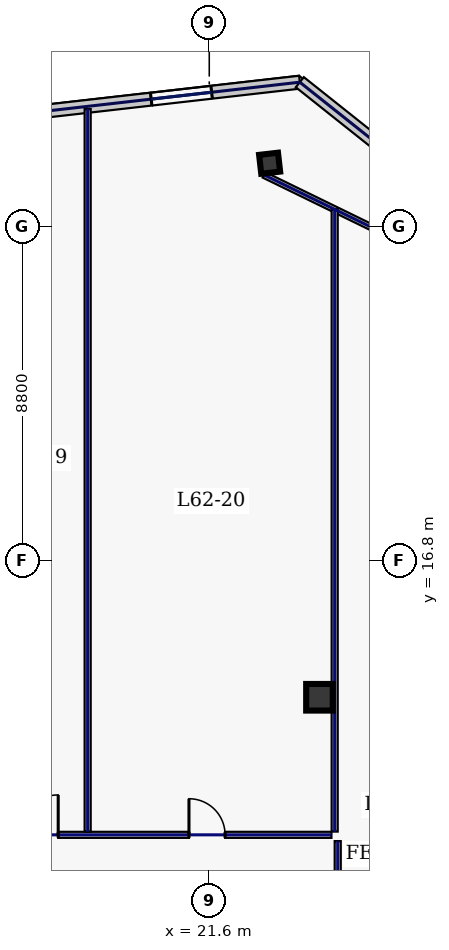
"""IFC4 building model, lengths in metres.
Left out: names, types, materials, properties, quantities, classifications, styles, units other than length and angle.
Written with IfcOpenShell. Run it as: python <this file> out.ifc"""

import sys

from ifc_helpers import new_model, si_unit, direction, frame, frame_2d, origin, origin_2d, place, context, subcontext, project, spatial, rectangle, hollow_rectangle, extrude, element, fill, save


model = new_model("IFC4")
c1 = context("Model", 3, precision=1e-05, world=origin(), true_north=direction((0.0, 1.0)))
c2 = subcontext(c1, "Body", "Model", "MODEL_VIEW")
j1 = project(units=[si_unit("LENGTHUNIT", "METRE"), si_unit("PLANEANGLEUNIT", "RADIAN")], contexts=[c1])
p1 = place(None, origin())
s1 = spatial("IfcSite", under=j1, at=p1, CompositionType="ELEMENT")
p2 = place(p1, origin())
s2 = spatial("IfcBuilding", under=s1, at=p2, CompositionType="ELEMENT")
p3 = place(p2, frame((0.0, 0.0, 267.0)))
s3 = spatial("IfcBuildingStorey", under=s2, at=p3, CompositionType="ELEMENT", Elevation=267.0)
p4 = place(p3, frame((24.5, 13.2, 0.0), z_axis=(0.0, 0.0, 1.0), x_axis=(1.0, 0.0, 0.0)))
e1 = element("IfcColumn", 1, at=p4, inside=s3, PredefinedType="COLUMN", context=c2, shape_type="SweptSolid", body=[
    extrude(hollow_rectangle(XDim=0.7, YDim=0.7, WallThickness=0.032, at=origin_2d()), origin(), (0.0, 0.0, 1.0), 3.68),
])
p5 = place(p3, frame((23.188, 27.253, 0.0), z_axis=(0.0, 0.0, 1.0), x_axis=(0.993571855677, 0.113203213768, 0.0)))
e2 = element("IfcColumn", 2, at=p5, inside=s3, PredefinedType="COLUMN", context=c2, shape_type="SweptSolid", body=[
    extrude(hollow_rectangle(XDim=0.5, YDim=0.5, WallThickness=0.025, at=origin_2d()), origin(), (0.0, 0.0, 1.0), 3.68),
])
p6 = place(p3, frame((23.983, 29.386, 0.0), z_axis=(0.0, 0.0, 1.0), x_axis=(-0.993572271362, -0.113199565282, 0.0)))
e3 = element("IfcWall", 3, at=p6, inside=s3, PredefinedType="STANDARD", context=c2, shape_type="SweptSolid", body=[
    extrude(rectangle(XDim=18.651, YDim=0.34, at=frame_2d((9.326, 0.0))), origin(), (0.0, 0.0, 1.0), 3.68),
])
p7 = place(p6, frame((10.229, 0.0, 0.22)))
e4 = element("IfcOpeningElement", 4, at=p7, cuts=e3, PredefinedType="OPENING", context=c2, shape_type="SweptSolid", body=[
    extrude(rectangle(XDim=1.6, YDim=1.2, at=frame_2d((0.8, 0.6))), frame((0.0, 0.18, 0.0), z_axis=(0.0, -1.0, 0.0), x_axis=(1.0, 0.0, 0.0)), (0.0, 0.0, 1.0), 0.36),
])
p8 = place(p6, frame((2.336, 0.0, 0.22)))
e5 = element("IfcOpeningElement", 5, at=p8, cuts=e3, PredefinedType="OPENING", context=c2, shape_type="SweptSolid", body=[
    extrude(rectangle(XDim=1.6, YDim=1.2, at=frame_2d((0.8, 0.6))), frame((0.0, 0.18, 0.0), z_axis=(0.0, -1.0, 0.0), x_axis=(1.0, 0.0, 0.0)), (0.0, 0.0, 1.0), 0.36),
])
p9 = place(p3, frame((29.107, 25.31, 0.0), z_axis=(0.0, 0.0, 1.0), x_axis=(-0.78259733853, 0.62252823689, 0.0)))
e6 = element("IfcWall", 6, at=p9, inside=s3, PredefinedType="STANDARD", context=c2, shape_type="SweptSolid", body=[
    extrude(rectangle(XDim=6.548, YDim=0.34, at=frame_2d((3.274, 0.0))), origin(), (0.0, 0.0, 1.0), 3.68),
])
p10 = place(p3, frame((28.528, 24.271, 0.0), z_axis=(0.0, 0.0, 1.0), x_axis=(-0.898820692789, 0.438316509173, 0.0)))
e7 = element("IfcWall", 7, at=p10, inside=s3, PredefinedType="PARTITIONING", context=c2, shape_type="SweptSolid", body=[
    extrude(rectangle(XDim=6.107, YDim=0.16, at=frame_2d((3.053, 0.0))), origin(), (0.0, 0.0, 1.0), 1.475),
])
p11 = place(p3, frame((-24.815, 9.58, 0.0), z_axis=(0.0, 0.0, 1.0), x_axis=(1.0, 0.0, 0.0)))
e8 = element("IfcWall", 8, at=p11, inside=s3, PredefinedType="PARTITIONING", context=c2, shape_type="SweptSolid", body=[
    extrude(rectangle(XDim=49.63, YDim=0.16, at=frame_2d((24.815, 0.0))), origin(), (0.0, 0.0, 1.0), 3.68),
])
p12 = place(p11, frame((1.509, 0.0, 0.0)))
e9 = element("IfcOpeningElement", 9, at=p12, cuts=e8, PredefinedType="OPENING", context=c2, shape_type="SweptSolid", body=[
    extrude(rectangle(XDim=1.3, YDim=2.2, at=frame_2d((0.65, 1.1))), frame((0.0, 0.09, 0.0), z_axis=(0.0, -1.0, 0.0), x_axis=(1.0, 0.0, 0.0)), (0.0, 0.0, 1.0), 0.18),
])
p13 = place(p11, frame((7.045, 0.0, 0.0)))
e10 = element("IfcOpeningElement", 10, at=p13, cuts=e8, PredefinedType="OPENING", context=c2, shape_type="SweptSolid", body=[
    extrude(rectangle(XDim=1.3, YDim=2.2, at=frame_2d((0.65, 1.1))), frame((0.0, 0.09, 0.0), z_axis=(0.0, -1.0, 0.0), x_axis=(1.0, 0.0, 0.0)), (0.0, 0.0, 1.0), 0.18),
])
p14 = place(p11, frame((12.325, 0.0, 0.0)))
e11 = element("IfcOpeningElement", 11, at=p14, cuts=e8, PredefinedType="OPENING", context=c2, shape_type="SweptSolid", body=[
    extrude(rectangle(XDim=1.05, YDim=2.2, at=frame_2d((0.525, 1.1))), frame((0.0, 0.09, 0.0), z_axis=(0.0, -1.0, 0.0), x_axis=(1.0, 0.0, 0.0)), (0.0, 0.0, 1.0), 0.18),
])
p15 = place(p11, frame((21.51, 0.0, 0.0)))
e12 = element("IfcOpeningElement", 12, at=p15, cuts=e8, PredefinedType="OPENING", context=c2, shape_type="SweptSolid", body=[
    extrude(rectangle(XDim=1.3, YDim=2.2, at=frame_2d((0.65, 1.1))), frame((0.0, 0.09, 0.0), z_axis=(0.0, -1.0, 0.0), x_axis=(1.0, 0.0, 0.0)), (0.0, 0.0, 1.0), 0.18),
])
p16 = place(p11, frame((27.065, 0.0, 0.0)))
e13 = element("IfcOpeningElement", 13, at=p16, cuts=e8, PredefinedType="OPENING", context=c2, shape_type="SweptSolid", body=[
    extrude(rectangle(XDim=1.15, YDim=2.2, at=frame_2d((0.575, 1.1))), frame((0.0, 0.09, 0.0), z_axis=(0.0, -1.0, 0.0), x_axis=(1.0, 0.0, 0.0)), (0.0, 0.0, 1.0), 0.18),
])
p17 = place(p11, frame((32.2, 0.0, 0.0)))
e14 = element("IfcOpeningElement", 14, at=p17, cuts=e8, PredefinedType="OPENING", context=c2, shape_type="SweptSolid", body=[
    extrude(rectangle(XDim=1.45, YDim=2.2, at=frame_2d((0.725, 1.1))), frame((0.0, 0.09, 0.0), z_axis=(0.0, -1.0, 0.0), x_axis=(1.0, 0.0, 0.0)), (0.0, 0.0, 1.0), 0.18),
])
p18 = place(p11, frame((37.14, 0.0, 0.0)))
e15 = element("IfcOpeningElement", 15, at=p18, cuts=e8, PredefinedType="OPENING", context=c2, shape_type="SweptSolid", body=[
    extrude(rectangle(XDim=0.95, YDim=2.2, at=frame_2d((0.475, 1.1))), frame((0.0, 0.09, 0.0), z_axis=(0.0, -1.0, 0.0), x_axis=(1.0, 0.0, 0.0)), (0.0, 0.0, 1.0), 0.18),
])
p19 = place(p11, frame((41.39, 0.0, 0.0)))
e16 = element("IfcOpeningElement", 16, at=p19, cuts=e8, PredefinedType="OPENING", context=c2, shape_type="SweptSolid", body=[
    extrude(rectangle(XDim=1.05, YDim=2.2, at=frame_2d((0.525, 1.1))), frame((0.0, 0.09, 0.0), z_axis=(0.0, -1.0, 0.0), x_axis=(1.0, 0.0, 0.0)), (0.0, 0.0, 1.0), 0.18),
])
p20 = place(p11, frame((45.881, 0.0, 0.0)))
e17 = element("IfcOpeningElement", 17, at=p20, cuts=e8, PredefinedType="OPENING", context=c2, shape_type="SweptSolid", body=[
    extrude(rectangle(XDim=0.95, YDim=2.2, at=frame_2d((0.475, 1.1))), frame((0.0, 0.09, 0.0), z_axis=(0.0, -1.0, 0.0), x_axis=(1.0, 0.0, 0.0)), (0.0, 0.0, 1.0), 0.18),
])
p21 = place(p3, frame((24.98, 9.415, 0.0), z_axis=(0.0, 0.0, 1.0), x_axis=(0.0, -1.0, 0.0)))
e18 = element("IfcWall", 18, at=p21, inside=s3, PredefinedType="PARTITIONING", context=c2, shape_type="SweptSolid", body=[
    extrude(rectangle(XDim=18.63, YDim=0.16, at=frame_2d((9.315, 0.0))), origin(), (0.0, 0.0, 1.0), 3.68),
])
p22 = place(p21, frame((16.081, 0.0, 0.0)))
e19 = element("IfcOpeningElement", 19, at=p22, cuts=e18, PredefinedType="OPENING", context=c2, shape_type="SweptSolid", body=[
    extrude(rectangle(XDim=0.95, YDim=2.2, at=frame_2d((0.475, 1.1))), frame((0.0, 0.09, 0.0), z_axis=(0.0, -1.0, 0.0), x_axis=(1.0, 0.0, 0.0)), (0.0, 0.0, 1.0), 0.18),
])
p23 = place(p21, frame((11.0, 0.0, 0.0)))
e20 = element("IfcOpeningElement", 20, at=p23, cuts=e18, PredefinedType="OPENING", context=c2, shape_type="SweptSolid", body=[
    extrude(rectangle(XDim=0.95, YDim=2.2, at=frame_2d((0.475, 1.1))), frame((0.0, 0.09, 0.0), z_axis=(0.0, -1.0, 0.0), x_axis=(1.0, 0.0, 0.0)), (0.0, 0.0, 1.0), 0.18),
])
p24 = place(p21, frame((5.8, 0.0, 0.0)))
e21 = element("IfcOpeningElement", 21, at=p24, cuts=e18, PredefinedType="OPENING", context=c2, shape_type="SweptSolid", body=[
    extrude(rectangle(XDim=0.95, YDim=2.2, at=frame_2d((0.475, 1.1))), frame((0.0, 0.09, 0.0), z_axis=(0.0, -1.0, 0.0), x_axis=(1.0, 0.0, 0.0)), (0.0, 0.0, 1.0), 0.18),
])
p25 = place(p21, frame((1.749, 0.0, 0.0)))
e22 = element("IfcOpeningElement", 22, at=p25, cuts=e18, PredefinedType="OPENING", context=c2, shape_type="SweptSolid", body=[
    extrude(rectangle(XDim=0.95, YDim=2.2, at=frame_2d((0.475, 1.1))), frame((0.0, 0.09, 0.0), z_axis=(0.0, -1.0, 0.0), x_axis=(1.0, 0.0, 0.0)), (0.0, 0.0, 1.0), 0.18),
])
p26 = place(p3, frame((24.9, 9.665, 0.0), z_axis=(0.0, 0.0, 1.0), x_axis=(0.0, 1.0, 0.0)))
e23 = element("IfcWall", 23, at=p26, inside=s3, PredefinedType="PARTITIONING", context=c2, shape_type="SweptSolid", body=[
    extrude(rectangle(XDim=16.379, YDim=0.16, at=frame_2d((8.19, 0.0))), origin(), (0.0, 0.0, 1.0), 3.68),
])
p27 = place(p3, frame((18.4, 9.665, 0.0), z_axis=(0.0, 0.0, 1.0), x_axis=(0.0, 1.0, 0.0)))
e24 = element("IfcWall", 24, at=p27, inside=s3, PredefinedType="PARTITIONING", context=c2, shape_type="SweptSolid", body=[
    extrude(rectangle(XDim=19.015, YDim=0.16, at=frame_2d((9.507, 0.0))), origin(), (0.0, 0.0, 1.0), 3.68),
])
p28 = place(p8, origin())
e25 = element("IfcWindow", 25, at=p28, inside=s3, PartitioningType="SINGLE_PANEL", PredefinedType="WINDOW", context=c2, shape_type="SweptSolid", body=[
    extrude(rectangle(XDim=1.6, YDim=1.2, at=frame_2d((0.8, 0.6))), frame((0.0, 0.03, 0.0), z_axis=(0.0, -1.0, 0.0), x_axis=(1.0, 0.0, 0.0)), (0.0, 0.0, 1.0), 0.06),
])
fill(e5, e25)
p29 = place(p19, origin())
e26 = element("IfcDoor", 26, at=p29, inside=s3, OperationType="SINGLE_SWING_RIGHT", PredefinedType="DOOR", context=c2, shape_type="SweptSolid", body=[
    extrude(rectangle(XDim=1.05, YDim=2.2, at=frame_2d((0.525, 1.1))), frame((0.0, 0.025, 0.0), z_axis=(0.0, -1.0, 0.0), x_axis=(1.0, 0.0, 0.0)), (0.0, 0.0, 1.0), 0.05),
])
fill(e16, e26)
p30 = place(p20, origin())
e27 = element("IfcDoor", 27, at=p30, inside=s3, OperationType="SINGLE_SWING_LEFT", PredefinedType="DOOR", context=c2, shape_type="SweptSolid", body=[
    extrude(rectangle(XDim=0.95, YDim=2.2, at=frame_2d((0.475, 1.1))), frame((0.0, 0.025, 0.0), z_axis=(0.0, -1.0, 0.0), x_axis=(1.0, 0.0, 0.0)), (0.0, 0.0, 1.0), 0.05),
])
fill(e17, e27)
save(model, sys.argv[1])
